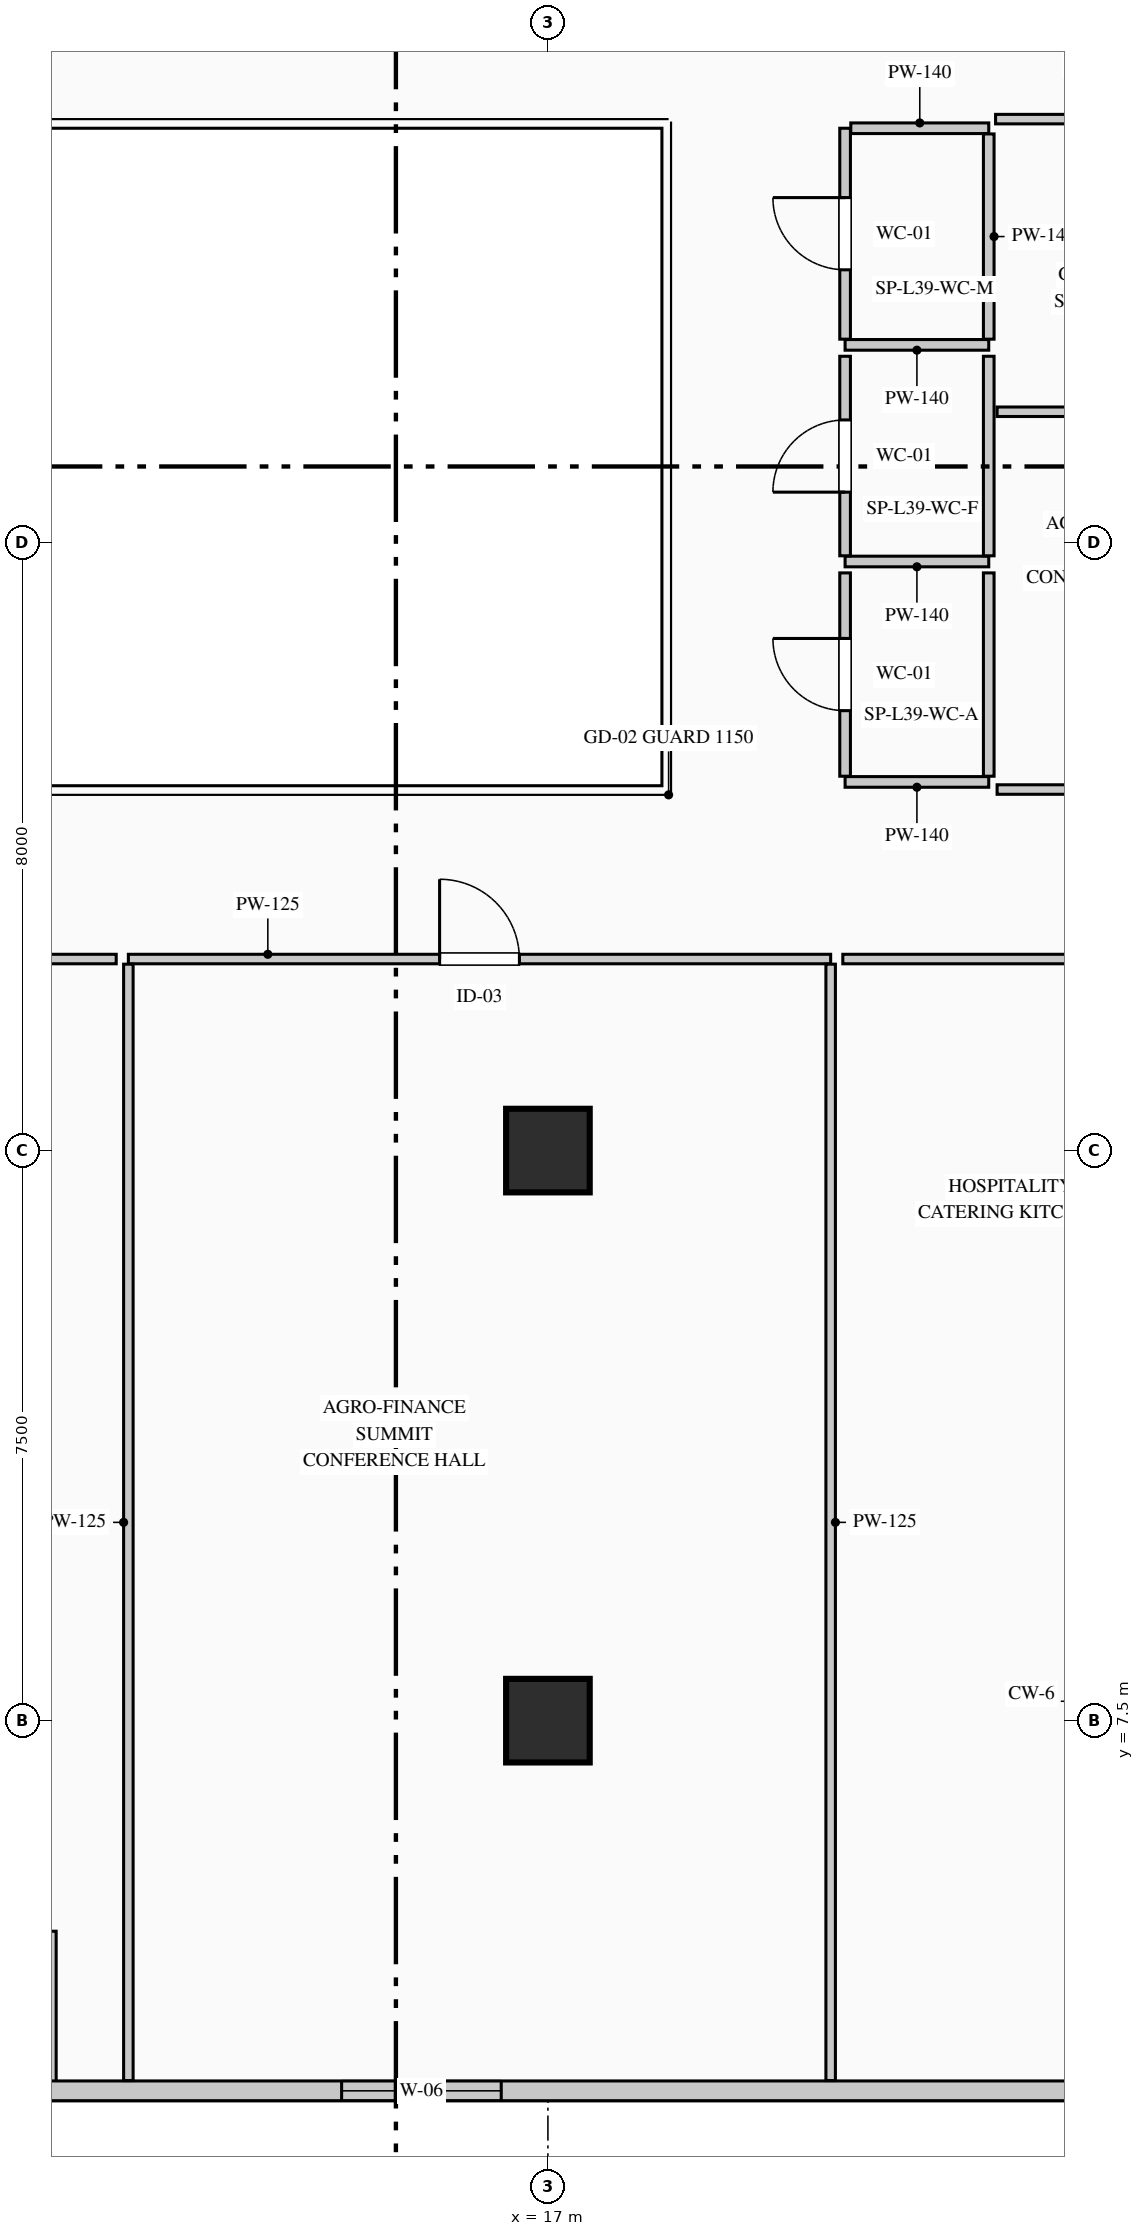
"""IFC4 building model, lengths in metres.
Left out: names, types, materials, properties, quantities, classifications, styles, units other than length and angle.
Written with IfcOpenShell. Run it as: python <this file> out.ifc"""

import sys

from ifc_helpers import new_model, si_unit, direction, frame, frame_2d, origin, origin_2d, place, context, subcontext, project, spatial, rectangle, extrude, element, fill, save


model = new_model("IFC4")
c1 = context("Model", 3, precision=1e-05, world=origin(), true_north=direction((0.0, 1.0)))
c2 = subcontext(c1, "Body", "Model", "MODEL_VIEW")
j1 = project(units=[si_unit("LENGTHUNIT", "METRE"), si_unit("PLANEANGLEUNIT", "RADIAN")], contexts=[c1])
p1 = place(None, origin())
s1 = spatial("IfcSite", under=j1, at=p1, CompositionType="ELEMENT")
p2 = place(p1, origin())
s2 = spatial("IfcBuilding", under=s1, at=p2, CompositionType="ELEMENT")
p3 = place(p2, frame((0.0, 0.0, 166.7)))
s3 = spatial("IfcBuildingStorey", under=s2, at=p3, CompositionType="ELEMENT", Elevation=166.7)
for number, where, z_axis, x_axis in (
    (1, (17.0, 7.5, 0.0), (0.0, 0.0, 1.0), (1.0, 0.0, 0.0)),
    (2, (17.0, 15.0, 0.0), (0.0, 0.0, 1.0), (1.0, 0.0, 0.0)),
):
    element("IfcColumn", number, at=place(p3, frame(where, z_axis=z_axis, x_axis=x_axis)), inside=s3, PredefinedType="COLUMN", context=c2, shape_type="SweptSolid", body=[
        extrude(rectangle(XDim=1.1, YDim=1.1, at=origin_2d()), origin(), (0.0, 0.0, 1.0), 3.95),
    ])
p4 = place(p3, frame((10.4, 2.63, 0.0), z_axis=(0.0, 0.0, 1.0), x_axis=(0.0, 1.0, 0.0)))
e3 = element("IfcWall", 3, at=p4, inside=s3, PredefinedType="STANDARD", context=c2, shape_type="SweptSolid", body=[
    extrude(rectangle(XDim=2.1, YDim=0.26, at=frame_2d((1.05, 0.0))), origin(), (0.0, 0.0, 1.0), 3.69),
])
p5 = place(p3, frame((24.11, 2.63, 0.0), z_axis=(0.0, 0.0, 1.0), x_axis=(-1.0, 0.0, 0.0)))
e4 = element("IfcWall", 4, at=p5, inside=s3, PredefinedType="STANDARD", context=c2, shape_type="SweptSolid", body=[
    extrude(rectangle(XDim=13.71, YDim=0.26, at=frame_2d((6.855, 0.0))), origin(), (0.0, 0.0, 1.0), 3.69),
])
p6 = place(p5, frame((7.724, 0.0, 0.9)))
e5 = element("IfcOpeningElement", 5, at=p6, cuts=e4, PredefinedType="OPENING", context=c2, shape_type="SweptSolid", body=[
    extrude(rectangle(XDim=2.1, YDim=2.0, at=frame_2d((1.05, 1.0))), frame((0.0, 0.14, 0.0), z_axis=(0.0, -1.0, 0.0), x_axis=(1.0, 0.0, 0.0)), (0.0, 0.0, 1.0), 0.28),
])
p7 = place(p3, frame((22.8, 25.6, 0.0), z_axis=(0.0, 0.0, 1.0), x_axis=(-1.0, 0.0, 0.0)))
e6 = element("IfcWall", 6, at=p7, inside=s3, PredefinedType="PARTITIONING", context=c2, shape_type="SweptSolid", body=[
    extrude(rectangle(XDim=1.89, YDim=0.14, at=frame_2d((0.945, 0.0))), origin(), (0.0, 0.0, 1.0), 3.69),
])
p8 = place(p3, frame((20.91, 25.675, 0.0), z_axis=(0.0, 0.0, 1.0), x_axis=(0.0, 1.0, 0.0)))
e7 = element("IfcWall", 7, at=p8, inside=s3, PredefinedType="PARTITIONING", context=c2, shape_type="SweptSolid", body=[
    extrude(rectangle(XDim=2.775, YDim=0.14, at=frame_2d((1.387, 0.0))), origin(), (0.0, 0.0, 1.0), 3.69),
])
p9 = place(p8, frame((0.913, 0.0, 0.0)))
e8 = element("IfcOpeningElement", 8, at=p9, cuts=e7, PredefinedType="OPENING", context=c2, shape_type="SweptSolid", body=[
    extrude(rectangle(XDim=0.95, YDim=2.15, at=frame_2d((0.475, 1.075))), frame((0.0, 0.08, 0.0), z_axis=(0.0, -1.0, 0.0), x_axis=(1.0, 0.0, 0.0)), (0.0, 0.0, 1.0), 0.16),
])
p10 = place(p3, frame((20.985, 28.45, 0.0), z_axis=(0.0, 0.0, 1.0), x_axis=(1.0, 0.0, 0.0)))
e9 = element("IfcWall", 9, at=p10, inside=s3, PredefinedType="PARTITIONING", context=c2, shape_type="SweptSolid", body=[
    extrude(rectangle(XDim=1.815, YDim=0.14, at=frame_2d((0.907, 0.0))), origin(), (0.0, 0.0, 1.0), 3.69),
])
p11 = place(p3, frame((22.8, 28.375, 0.0), z_axis=(0.0, 0.0, 1.0), x_axis=(0.0, -1.0, 0.0)))
e10 = element("IfcWall", 10, at=p11, inside=s3, PredefinedType="PARTITIONING", context=c2, shape_type="SweptSolid", body=[
    extrude(rectangle(XDim=2.7, YDim=0.14, at=frame_2d((1.35, 0.0))), origin(), (0.0, 0.0, 1.0), 3.375),
])
p12 = place(p3, frame((22.8, 22.75, 0.0), z_axis=(0.0, 0.0, 1.0), x_axis=(-1.0, 0.0, 0.0)))
e11 = element("IfcWall", 11, at=p12, inside=s3, PredefinedType="PARTITIONING", context=c2, shape_type="SweptSolid", body=[
    extrude(rectangle(XDim=1.89, YDim=0.14, at=frame_2d((0.945, 0.0))), origin(), (0.0, 0.0, 1.0), 3.69),
])
p13 = place(p3, frame((20.91, 22.825, 0.0), z_axis=(0.0, 0.0, 1.0), x_axis=(0.0, 1.0, 0.0)))
e12 = element("IfcWall", 12, at=p13, inside=s3, PredefinedType="PARTITIONING", context=c2, shape_type="SweptSolid", body=[
    extrude(rectangle(XDim=2.625, YDim=0.14, at=frame_2d((1.312, 0.0))), origin(), (0.0, 0.0, 1.0), 3.69),
])
p14 = place(p13, frame((0.837, 0.0, 0.0)))
e13 = element("IfcOpeningElement", 13, at=p14, cuts=e12, PredefinedType="OPENING", context=c2, shape_type="SweptSolid", body=[
    extrude(rectangle(XDim=0.95, YDim=2.15, at=frame_2d((0.475, 1.075))), frame((0.0, 0.08, 0.0), z_axis=(0.0, -1.0, 0.0), x_axis=(1.0, 0.0, 0.0)), (0.0, 0.0, 1.0), 0.16),
])
p15 = place(p3, frame((22.8, 25.45, 0.0), z_axis=(0.0, 0.0, 1.0), x_axis=(0.0, -1.0, 0.0)))
e14 = element("IfcWall", 14, at=p15, inside=s3, PredefinedType="PARTITIONING", context=c2, shape_type="SweptSolid", body=[
    extrude(rectangle(XDim=2.625, YDim=0.14, at=frame_2d((1.312, 0.0))), origin(), (0.0, 0.0, 1.0), 3.375),
])
p16 = place(p3, frame((22.8, 19.85, 0.0), z_axis=(0.0, 0.0, 1.0), x_axis=(-1.0, 0.0, 0.0)))
e15 = element("IfcWall", 15, at=p16, inside=s3, PredefinedType="PARTITIONING", context=c2, shape_type="SweptSolid", body=[
    extrude(rectangle(XDim=1.89, YDim=0.14, at=frame_2d((0.945, 0.0))), origin(), (0.0, 0.0, 1.0), 3.69),
])
p17 = place(p3, frame((20.91, 19.925, 0.0), z_axis=(0.0, 0.0, 1.0), x_axis=(0.0, 1.0, 0.0)))
e16 = element("IfcWall", 16, at=p17, inside=s3, PredefinedType="PARTITIONING", context=c2, shape_type="SweptSolid", body=[
    extrude(rectangle(XDim=2.675, YDim=0.14, at=frame_2d((1.337, 0.0))), origin(), (0.0, 0.0, 1.0), 3.69),
])
p18 = place(p17, frame((0.863, 0.0, 0.0)))
e17 = element("IfcOpeningElement", 17, at=p18, cuts=e16, PredefinedType="OPENING", context=c2, shape_type="SweptSolid", body=[
    extrude(rectangle(XDim=0.95, YDim=2.15, at=frame_2d((0.475, 1.075))), frame((0.0, 0.08, 0.0), z_axis=(0.0, -1.0, 0.0), x_axis=(1.0, 0.0, 0.0)), (0.0, 0.0, 1.0), 0.16),
])
p19 = place(p3, frame((22.8, 22.6, 0.0), z_axis=(0.0, 0.0, 1.0), x_axis=(0.0, -1.0, 0.0)))
e18 = element("IfcWall", 18, at=p19, inside=s3, PredefinedType="PARTITIONING", context=c2, shape_type="SweptSolid", body=[
    extrude(rectangle(XDim=2.675, YDim=0.14, at=frame_2d((1.337, 0.0))), origin(), (0.0, 0.0, 1.0), 3.375),
])
p20 = place(p3, frame((11.48, 17.52, 0.0), z_axis=(0.0, 0.0, 1.0), x_axis=(1.0, 0.0, 0.0)))
e19 = element("IfcWall", 19, at=p20, inside=s3, PredefinedType="PARTITIONING", context=c2, shape_type="SweptSolid", body=[
    extrude(rectangle(XDim=9.24, YDim=0.125, at=frame_2d((4.62, 0.0))), origin(), (0.0, 0.0, 1.0), 3.69),
])
p21 = place(p20, frame((4.095, 0.0, 0.0)))
e20 = element("IfcOpeningElement", 20, at=p21, cuts=e19, PredefinedType="OPENING", context=c2, shape_type="SweptSolid", body=[
    extrude(rectangle(XDim=1.05, YDim=2.15, at=frame_2d((0.525, 1.075))), frame((0.0, 0.073, 0.0), z_axis=(0.0, -1.0, 0.0), x_axis=(1.0, 0.0, 0.0)), (0.0, 0.0, 1.0), 0.145),
])
for number, where, z_axis, x_axis in (
    (21, (20.72, 17.452, 0.0), (0.0, 0.0, 1.0), (0.0, -1.0, 0.0)),
    (22, (11.48, 2.765, 0.0), (0.0, 0.0, 1.0), (0.0, 1.0, 0.0)),
):
    element("IfcWall", number, at=place(p3, frame(where, z_axis=z_axis, x_axis=x_axis)), inside=s3, PredefinedType="PARTITIONING", context=c2, shape_type="SweptSolid", body=[
        extrude(rectangle(XDim=14.688, YDim=0.125, at=frame_2d((7.344, 0.0))), origin(), (0.0, 0.0, 1.0), 3.69),
    ])
p22 = place(p3, frame((6.36, 17.52, 0.0), z_axis=(0.0, 0.0, 1.0), x_axis=(1.0, 0.0, 0.0)))
e23 = element("IfcWall", 23, at=p22, inside=s3, PredefinedType="PARTITIONING", context=c2, shape_type="SweptSolid", body=[
    extrude(rectangle(XDim=4.96, YDim=0.125, at=frame_2d((2.48, 0.0))), origin(), (0.0, 0.0, 1.0), 3.69),
])
p23 = place(p22, frame((1.955, 0.0, 0.0)))
e24 = element("IfcOpeningElement", 24, at=p23, cuts=e23, PredefinedType="OPENING", context=c2, shape_type="SweptSolid", body=[
    extrude(rectangle(XDim=1.05, YDim=2.15, at=frame_2d((0.525, 1.075))), frame((0.0, 0.073, 0.0), z_axis=(0.0, -1.0, 0.0), x_axis=(1.0, 0.0, 0.0)), (0.0, 0.0, 1.0), 0.145),
])
p24 = place(p3, frame((20.88, 17.52, 0.0), z_axis=(0.0, 0.0, 1.0), x_axis=(1.0, 0.0, 0.0)))
e25 = element("IfcWall", 25, at=p24, inside=s3, PredefinedType="PARTITIONING", context=c2, shape_type="SweptSolid", body=[
    extrude(rectangle(XDim=9.24, YDim=0.125, at=frame_2d((4.62, 0.0))), origin(), (0.0, 0.0, 1.0), 3.375),
])
p25 = place(p24, frame((4.095, 0.0, 0.0)))
e26 = element("IfcOpeningElement", 26, at=p25, cuts=e25, PredefinedType="OPENING", context=c2, shape_type="SweptSolid", body=[
    extrude(rectangle(XDim=1.05, YDim=2.15, at=frame_2d((0.525, 1.075))), frame((0.0, 0.073, 0.0), z_axis=(0.0, -1.0, 0.0), x_axis=(1.0, 0.0, 0.0)), (0.0, 0.0, 1.0), 0.145),
])
p26 = place(p3, frame((25.976, 19.75, 0.0), z_axis=(0.0, 0.0, 1.0), x_axis=(-1.0, 0.0, 0.0)))
e27 = element("IfcWall", 27, at=p26, inside=s3, PredefinedType="PARTITIONING", context=c2, shape_type="SweptSolid", body=[
    extrude(rectangle(XDim=3.066, YDim=0.125, at=frame_2d((1.533, 0.0))), origin(), (0.0, 0.0, 1.0), 3.69),
])
p27 = place(p26, frame((1.008, 0.0, 0.0)))
e28 = element("IfcOpeningElement", 28, at=p27, cuts=e27, PredefinedType="OPENING", context=c2, shape_type="SweptSolid", body=[
    extrude(rectangle(XDim=1.05, YDim=2.15, at=frame_2d((0.525, 1.075))), frame((0.0, 0.073, 0.0), z_axis=(0.0, -1.0, 0.0), x_axis=(1.0, 0.0, 0.0)), (0.0, 0.0, 1.0), 0.145),
])
p28 = place(p3, frame((22.91, 24.72, 0.0), z_axis=(0.0, 0.0, 1.0), x_axis=(1.0, 0.0, 0.0)))
e29 = element("IfcWall", 29, at=p28, inside=s3, PredefinedType="PARTITIONING", context=c2, shape_type="SweptSolid", body=[
    extrude(rectangle(XDim=7.21, YDim=0.125, at=frame_2d((3.605, 0.0))), origin(), (0.0, 0.0, 1.0), 3.375),
])
p29 = place(p3, frame((22.89, 28.57, 0.0), z_axis=(0.0, 0.0, 1.0), x_axis=(1.0, 0.0, 0.0)))
e30 = element("IfcWall", 30, at=p29, inside=s3, PredefinedType="PARTITIONING", context=c2, shape_type="SweptSolid", body=[
    extrude(rectangle(XDim=7.23, YDim=0.125, at=frame_2d((3.615, 0.0))), origin(), (0.0, 0.0, 1.0), 3.375),
])
p30 = place(p29, frame((3.09, 0.0, 0.0)))
e31 = element("IfcOpeningElement", 31, at=p30, cuts=e30, PredefinedType="OPENING", context=c2, shape_type="SweptSolid", body=[
    extrude(rectangle(XDim=1.05, YDim=2.15, at=frame_2d((0.525, 1.075))), frame((0.0, 0.073, 0.0), z_axis=(0.0, -1.0, 0.0), x_axis=(1.0, 0.0, 0.0)), (0.0, 0.0, 1.0), 0.145),
])
p31 = place(p6, origin())
e32 = element("IfcWindow", 32, at=p31, inside=s3, PartitioningType="DOUBLE_PANEL_VERTICAL", PredefinedType="WINDOW", context=c2, shape_type="SweptSolid", body=[
    extrude(rectangle(XDim=2.1, YDim=2.0, at=frame_2d((1.05, 1.0))), frame((0.0, 0.03, 0.0), z_axis=(0.0, -1.0, 0.0), x_axis=(1.0, 0.0, 0.0)), (0.0, 0.0, 1.0), 0.06),
])
fill(e5, e32)
p32 = place(p9, origin())
e33 = element("IfcDoor", 33, at=p32, inside=s3, OperationType="SINGLE_SWING_RIGHT", PredefinedType="DOOR", context=c2, shape_type="SweptSolid", body=[
    extrude(rectangle(XDim=0.95, YDim=2.15, at=frame_2d((0.475, 1.075))), frame((0.0, 0.025, 0.0), z_axis=(0.0, -1.0, 0.0), x_axis=(1.0, 0.0, 0.0)), (0.0, 0.0, 1.0), 0.05),
])
fill(e8, e33)
p33 = place(p14, origin())
e34 = element("IfcDoor", 34, at=p33, inside=s3, OperationType="SINGLE_SWING_LEFT", PredefinedType="DOOR", context=c2, shape_type="SweptSolid", body=[
    extrude(rectangle(XDim=0.95, YDim=2.15, at=frame_2d((0.475, 1.075))), frame((0.0, 0.025, 0.0), z_axis=(0.0, -1.0, 0.0), x_axis=(1.0, 0.0, 0.0)), (0.0, 0.0, 1.0), 0.05),
])
fill(e13, e34)
p34 = place(p18, origin())
e35 = element("IfcDoor", 35, at=p34, inside=s3, OperationType="SINGLE_SWING_RIGHT", PredefinedType="DOOR", context=c2, shape_type="SweptSolid", body=[
    extrude(rectangle(XDim=0.95, YDim=2.15, at=frame_2d((0.475, 1.075))), frame((0.0, 0.025, 0.0), z_axis=(0.0, -1.0, 0.0), x_axis=(1.0, 0.0, 0.0)), (0.0, 0.0, 1.0), 0.05),
])
fill(e17, e35)
p35 = place(p21, origin())
e36 = element("IfcDoor", 36, at=p35, inside=s3, OperationType="SINGLE_SWING_LEFT", PredefinedType="DOOR", context=c2, shape_type="SweptSolid", body=[
    extrude(rectangle(XDim=1.05, YDim=2.15, at=frame_2d((0.525, 1.075))), frame((0.0, 0.025, 0.0), z_axis=(0.0, -1.0, 0.0), x_axis=(1.0, 0.0, 0.0)), (0.0, 0.0, 1.0), 0.05),
])
fill(e20, e36)
save(model, sys.argv[1])
